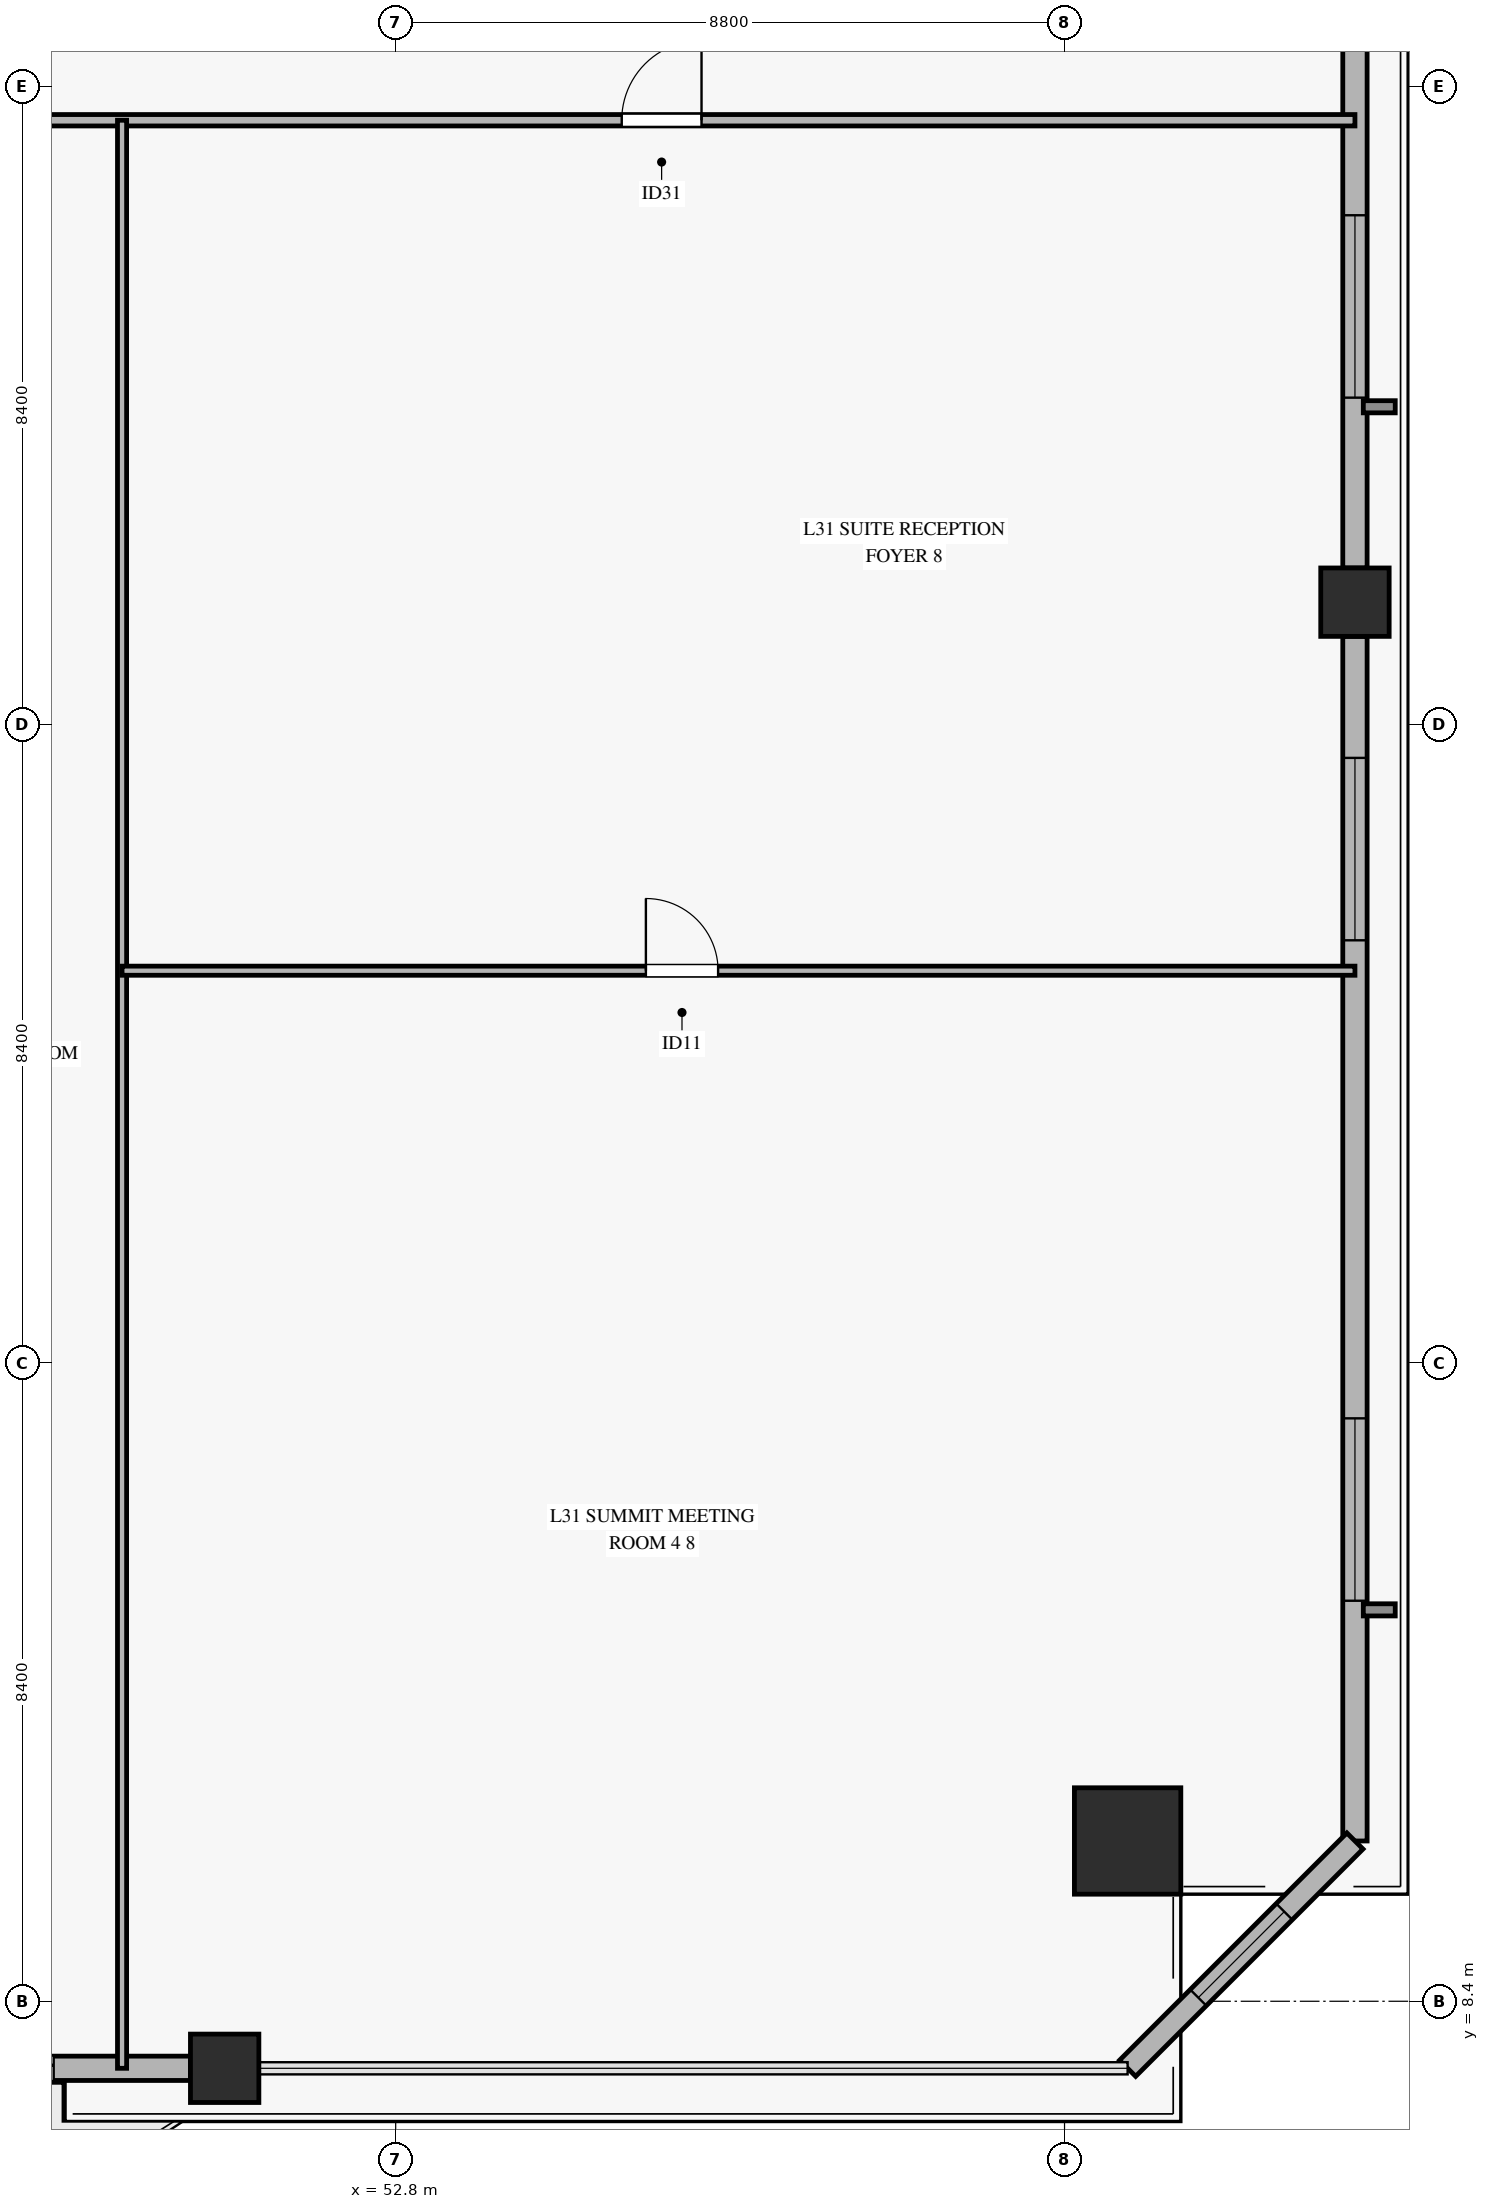
"""IFC4 building model, lengths in metres.
Left out: names, types, materials, properties, quantities, classifications, styles, units other than length and angle.
Written with IfcOpenShell. Run it as: python <this file> out.ifc"""

import sys

from ifc_helpers import new_model, si_unit, direction, frame, frame_2d, origin, origin_2d, place, context, subcontext, project, spatial, rectangle, hollow_rectangle, extrude, source, transform, mapped, element, fill, save


model = new_model("IFC4")
c1 = context("Model", 3, precision=1e-05, world=origin(), true_north=direction((0.0, 1.0)))
c2 = subcontext(c1, "Body", "Model", "MODEL_VIEW")
j1 = project(units=[si_unit("LENGTHUNIT", "METRE"), si_unit("PLANEANGLEUNIT", "RADIAN")], contexts=[c1])
p1 = place(None, origin())
s1 = spatial("IfcSite", under=j1, at=p1, CompositionType="ELEMENT")
p2 = place(p1, origin())
s2 = spatial("IfcBuilding", under=s1, at=p2, CompositionType="ELEMENT")
p3 = place(p2, frame((0.0, 0.0, 127.0)))
s3 = spatial("IfcBuildingStorey", under=s2, at=p3, CompositionType="ELEMENT", Elevation=127.0)
m1 = source(origin(), c2, "Body", "SweptSolid", [
    extrude(hollow_rectangle(XDim=1.4, YDim=1.4, WallThickness=0.065, at=origin_2d()), origin(), (0.0, 0.0, 1.0), 3.64),
])
p4 = place(p3, frame((62.43, 10.509, 0.0), z_axis=(0.0, 0.0, 1.0), x_axis=(1.0, 0.0, 0.0)))
e1 = element("IfcColumn", 1, at=p4, inside=s3, PredefinedType="COLUMN", context=c2, shape_type="MappedRepresentation", body=[
    mapped(m1, transform((0.0, 0.0, 0.0), x_axis=(1.0, 0.0, 0.0), y_axis=(0.0, 1.0, 0.0), z_axis=(0.0, 0.0, 1.0), scale=1.0)),
])
m2 = source(origin(), c2, "Body", "SweptSolid", [
    extrude(hollow_rectangle(XDim=0.9, YDim=0.9, WallThickness=0.04, at=origin_2d()), origin(), (0.0, 0.0, 1.0), 3.64),
])
for number, where, z_axis, x_axis in (
    (2, (50.55, 7.518, 0.0), (0.0, 0.0, 1.0), (1.0, 0.0, 0.0)),
    (3, (65.421, 26.809, 0.0), (0.0, 0.0, 1.0), (1.0, 0.0, 0.0)),
):
    element("IfcColumn", number, at=place(p3, frame(where, z_axis=z_axis, x_axis=x_axis)), inside=s3, PredefinedType="COLUMN", context=c2, shape_type="MappedRepresentation", body=[
        mapped(m2, transform((0.0, 0.0, 0.0), x_axis=(1.0, 0.0, 0.0), y_axis=(0.0, 1.0, 0.0), z_axis=(0.0, 0.0, 1.0), scale=1.0)),
    ])
p5 = place(p3, frame((44.75, 7.518, 0.0), z_axis=(0.0, 0.0, 1.0), x_axis=(1.0, 0.0, 0.0)))
e4 = element("IfcWall", 4, at=p5, inside=s3, PredefinedType="SOLIDWALL", context=c2, shape_type="SweptSolid", body=[
    extrude(rectangle(XDim=5.35, YDim=0.32, at=frame_2d((2.675, 0.0))), origin(), (0.0, 0.0, 1.0), 3.12),
])
p6 = place(p5, frame((1.75, 0.0, 0.0)))
e5 = element("IfcOpeningElement", 5, at=p6, cuts=e4, PredefinedType="OPENING", context=c2, shape_type="SweptSolid", body=[
    extrude(rectangle(XDim=1.8, YDim=2.25, at=frame_2d((0.9, 1.125))), frame((0.0, 0.17, 0.0), z_axis=(0.0, -1.0, 0.0), x_axis=(1.0, 0.0, 0.0)), (0.0, 0.0, 1.0), 0.34),
])
p7 = place(p3, frame((65.421, 10.509, 0.0), z_axis=(0.0, 0.0, 1.0), x_axis=(0.0, 1.0, 0.0)))
e6 = element("IfcWall", 6, at=p7, inside=s3, PredefinedType="SOLIDWALL", context=c2, shape_type="SweptSolid", body=[
    extrude(rectangle(XDim=15.85, YDim=0.32, at=frame_2d((7.925, 0.0))), origin(), (0.0, 0.0, 1.0), 3.12),
])
p8 = place(p7, frame((3.161, 0.0, 0.45)))
e7 = element("IfcOpeningElement", 7, at=p8, cuts=e6, PredefinedType="OPENING", context=c2, shape_type="SweptSolid", body=[
    extrude(rectangle(XDim=2.4, YDim=2.1, at=frame_2d((1.2, 1.05))), frame((0.0, 0.17, 0.0), z_axis=(0.0, -1.0, 0.0), x_axis=(1.0, 0.0, 0.0)), (0.0, 0.0, 1.0), 0.34),
])
p9 = place(p7, frame((11.851, 0.0, 0.45)))
e8 = element("IfcOpeningElement", 8, at=p9, cuts=e6, PredefinedType="OPENING", context=c2, shape_type="SweptSolid", body=[
    extrude(rectangle(XDim=2.4, YDim=2.1, at=frame_2d((1.2, 1.05))), frame((0.0, 0.17, 0.0), z_axis=(0.0, -1.0, 0.0), x_axis=(1.0, 0.0, 0.0)), (0.0, 0.0, 1.0), 0.34),
])
p10 = place(p3, frame((65.421, 27.259, 0.0), z_axis=(0.0, 0.0, 1.0), x_axis=(0.0, 1.0, 0.0)))
e9 = element("IfcWall", 9, at=p10, inside=s3, PredefinedType="SOLIDWALL", context=c2, shape_type="SweptSolid", body=[
    extrude(rectangle(XDim=15.85, YDim=0.32, at=frame_2d((7.925, 0.0))), origin(), (0.0, 0.0, 1.0), 3.12),
])
p11 = place(p10, frame((2.241, 0.0, 0.45)))
e10 = element("IfcOpeningElement", 10, at=p11, cuts=e9, PredefinedType="OPENING", context=c2, shape_type="SweptSolid", body=[
    extrude(rectangle(XDim=2.4, YDim=2.1, at=frame_2d((1.2, 1.05))), frame((0.0, 0.17, 0.0), z_axis=(0.0, -1.0, 0.0), x_axis=(1.0, 0.0, 0.0)), (0.0, 0.0, 1.0), 0.34),
])
p12 = place(p10, frame((12.708, 0.0, 0.45)))
e11 = element("IfcOpeningElement", 11, at=p12, cuts=e9, PredefinedType="OPENING", context=c2, shape_type="SweptSolid", body=[
    extrude(rectangle(XDim=2.4, YDim=2.1, at=frame_2d((1.2, 1.05))), frame((0.0, 0.17, 0.0), z_axis=(0.0, -1.0, 0.0), x_axis=(1.0, 0.0, 0.0)), (0.0, 0.0, 1.0), 0.34),
])
p13 = place(p3, frame((62.43, 7.518, 0.0), z_axis=(0.0, 0.0, 1.0), x_axis=(0.707106781187, 0.707106781187, 0.0)))
e12 = element("IfcWall", 12, at=p13, inside=s3, PredefinedType="SOLIDWALL", context=c2, shape_type="SweptSolid", body=[
    extrude(rectangle(XDim=4.23, YDim=0.3, at=frame_2d((2.115, 0.0))), origin(), (0.0, 0.0, 1.0), 3.12),
])
p14 = place(p13, frame((1.315, 0.0, 0.45)))
e13 = element("IfcOpeningElement", 13, at=p14, cuts=e12, PredefinedType="OPENING", context=c2, shape_type="SweptSolid", body=[
    extrude(rectangle(XDim=1.6, YDim=2.0, at=frame_2d((0.8, 1.0))), frame((0.0, 0.16, 0.0), z_axis=(0.0, -1.0, 0.0), x_axis=(1.0, 0.0, 0.0)), (0.0, 0.0, 1.0), 0.32),
])
p15 = place(p3, frame((4.979, 33.15, 0.0), z_axis=(0.0, 0.0, 1.0), x_axis=(1.0, 0.0, 0.0)))
e14 = element("IfcWall", 14, at=p15, inside=s3, PredefinedType="PARTITIONING", context=c2, shape_type="SweptSolid", body=[
    extrude(rectangle(XDim=60.442, YDim=0.15, at=frame_2d((30.221, 0.0))), origin(), (0.0, 0.0, 1.0), 2.725),
])
p16 = place(p15, frame((6.774, 0.0, 0.0)))
e15 = element("IfcOpeningElement", 15, at=p16, cuts=e14, PredefinedType="OPENING", context=c2, shape_type="SweptSolid", body=[
    extrude(rectangle(XDim=1.05, YDim=2.15, at=frame_2d((0.525, 1.075))), frame((0.0, 0.085, 0.0), z_axis=(0.0, -1.0, 0.0), x_axis=(1.0, 0.0, 0.0)), (0.0, 0.0, 1.0), 0.17),
])
p17 = place(p15, frame((17.131, 0.0, 0.0)))
e16 = element("IfcOpeningElement", 16, at=p17, cuts=e14, PredefinedType="OPENING", context=c2, shape_type="SweptSolid", body=[
    extrude(rectangle(XDim=1.05, YDim=2.15, at=frame_2d((0.525, 1.075))), frame((0.0, 0.085, 0.0), z_axis=(0.0, -1.0, 0.0), x_axis=(1.0, 0.0, 0.0)), (0.0, 0.0, 1.0), 0.17),
])
p18 = place(p15, frame((21.191, 0.0, 0.0)))
e17 = element("IfcOpeningElement", 17, at=p18, cuts=e14, PredefinedType="OPENING", context=c2, shape_type="SweptSolid", body=[
    extrude(rectangle(XDim=1.05, YDim=2.15, at=frame_2d((0.525, 1.075))), frame((0.0, 0.085, 0.0), z_axis=(0.0, -1.0, 0.0), x_axis=(1.0, 0.0, 0.0)), (0.0, 0.0, 1.0), 0.17),
])
p19 = place(p15, frame((26.768, 0.0, 0.0)))
e18 = element("IfcOpeningElement", 18, at=p19, cuts=e14, PredefinedType="OPENING", context=c2, shape_type="SweptSolid", body=[
    extrude(rectangle(XDim=1.05, YDim=2.15, at=frame_2d((0.525, 1.075))), frame((0.0, 0.085, 0.0), z_axis=(0.0, -1.0, 0.0), x_axis=(1.0, 0.0, 0.0)), (0.0, 0.0, 1.0), 0.17),
])
p20 = place(p15, frame((31.968, 0.0, 0.0)))
e19 = element("IfcOpeningElement", 19, at=p20, cuts=e14, PredefinedType="OPENING", context=c2, shape_type="SweptSolid", body=[
    extrude(rectangle(XDim=1.05, YDim=2.15, at=frame_2d((0.525, 1.075))), frame((0.0, 0.085, 0.0), z_axis=(0.0, -1.0, 0.0), x_axis=(1.0, 0.0, 0.0)), (0.0, 0.0, 1.0), 0.17),
])
p21 = place(p15, frame((37.084, 0.0, 0.0)))
e20 = element("IfcOpeningElement", 20, at=p21, cuts=e14, PredefinedType="OPENING", context=c2, shape_type="SweptSolid", body=[
    extrude(rectangle(XDim=1.05, YDim=2.15, at=frame_2d((0.525, 1.075))), frame((0.0, 0.085, 0.0), z_axis=(0.0, -1.0, 0.0), x_axis=(1.0, 0.0, 0.0)), (0.0, 0.0, 1.0), 0.17),
])
p22 = place(p15, frame((41.832, 0.0, 0.0)))
e21 = element("IfcOpeningElement", 21, at=p22, cuts=e14, PredefinedType="OPENING", context=c2, shape_type="SweptSolid", body=[
    extrude(rectangle(XDim=1.05, YDim=2.15, at=frame_2d((0.525, 1.075))), frame((0.0, 0.085, 0.0), z_axis=(0.0, -1.0, 0.0), x_axis=(1.0, 0.0, 0.0)), (0.0, 0.0, 1.0), 0.17),
])
p23 = place(p15, frame((50.795, 0.0, 0.0)))
e22 = element("IfcOpeningElement", 22, at=p23, cuts=e14, PredefinedType="OPENING", context=c2, shape_type="SweptSolid", body=[
    extrude(rectangle(XDim=1.05, YDim=2.15, at=frame_2d((0.525, 1.075))), frame((0.0, 0.085, 0.0), z_axis=(0.0, -1.0, 0.0), x_axis=(1.0, 0.0, 0.0)), (0.0, 0.0, 1.0), 0.17),
])
p24 = place(p3, frame((49.2, 7.518, 0.0), z_axis=(0.0, 0.0, 1.0), x_axis=(0.0, 1.0, 0.0)))
e23 = element("IfcWall", 23, at=p24, inside=s3, PredefinedType="PARTITIONING", context=c2, shape_type="SweptSolid", body=[
    extrude(rectangle(XDim=25.632, YDim=0.12, at=frame_2d((12.816, 0.0))), origin(), (0.0, 0.0, 1.0), 3.125),
])
p25 = place(p3, frame((49.2, 21.96, 0.0), z_axis=(0.0, 0.0, 1.0), x_axis=(1.0, 0.0, 0.0)))
e24 = element("IfcWall", 24, at=p25, inside=s3, PredefinedType="PARTITIONING", context=c2, shape_type="SweptSolid", body=[
    extrude(rectangle(XDim=16.221, YDim=0.12, at=frame_2d((8.11, 0.0))), origin(), (0.0, 0.0, 1.0), 2.725),
])
p26 = place(p25, frame((6.892, 0.0, 0.0)))
e25 = element("IfcOpeningElement", 25, at=p26, cuts=e24, PredefinedType="OPENING", context=c2, shape_type="SweptSolid", body=[
    extrude(rectangle(XDim=0.95, YDim=2.1, at=frame_2d((0.475, 1.05))), frame((0.0, 0.07, 0.0), z_axis=(0.0, -1.0, 0.0), x_axis=(1.0, 0.0, 0.0)), (0.0, 0.0, 1.0), 0.14),
])
m3 = source(origin(), c2, "Body", "SweptSolid", [
    extrude(rectangle(XDim=1.8, YDim=2.25, at=frame_2d((0.9, 1.125))), frame((0.0, 0.025, 0.0), z_axis=(0.0, -1.0, 0.0), x_axis=(1.0, 0.0, 0.0)), (0.0, 0.0, 1.0), 0.05),
])
p27 = place(p6, origin())
e26 = element("IfcDoor", 26, at=p27, inside=s3, OperationType="SLIDING_TO_LEFT", PredefinedType="DOOR", context=c2, shape_type="MappedRepresentation", body=[
    mapped(m3, transform((0.0, 0.0, 0.0), x_axis=(1.0, 0.0, 0.0), y_axis=(0.0, 1.0, 0.0), z_axis=(0.0, 0.0, 1.0), scale=1.0)),
])
fill(e5, e26)
m4 = source(origin(), c2, "Body", "SweptSolid", [
    extrude(rectangle(XDim=2.4, YDim=2.1, at=frame_2d((1.2, 1.05))), frame((0.0, 0.03, 0.0), z_axis=(0.0, -1.0, 0.0), x_axis=(1.0, 0.0, 0.0)), (0.0, 0.0, 1.0), 0.06),
])
p28 = place(p8, origin())
e27 = element("IfcWindow", 27, at=p28, inside=s3, PartitioningType="SINGLE_PANEL", PredefinedType="WINDOW", context=c2, shape_type="MappedRepresentation", body=[
    mapped(m4, transform((0.0, 0.0, 0.0), x_axis=(1.0, 0.0, 0.0), y_axis=(0.0, 1.0, 0.0), z_axis=(0.0, 0.0, 1.0), scale=1.0)),
])
fill(e7, e27)
p29 = place(p9, origin())
e28 = element("IfcWindow", 28, at=p29, inside=s3, PartitioningType="SINGLE_PANEL", PredefinedType="WINDOW", context=c2, shape_type="MappedRepresentation", body=[
    mapped(m4, transform((0.0, 0.0, 0.0), x_axis=(1.0, 0.0, 0.0), y_axis=(0.0, 1.0, 0.0), z_axis=(0.0, 0.0, 1.0), scale=1.0)),
])
fill(e8, e28)
p30 = place(p11, origin())
e29 = element("IfcWindow", 29, at=p30, inside=s3, PartitioningType="SINGLE_PANEL", PredefinedType="WINDOW", context=c2, shape_type="MappedRepresentation", body=[
    mapped(m4, transform((0.0, 0.0, 0.0), x_axis=(1.0, 0.0, 0.0), y_axis=(0.0, 1.0, 0.0), z_axis=(0.0, 0.0, 1.0), scale=1.0)),
])
fill(e10, e29)
m5 = source(origin(), c2, "Body", "SweptSolid", [
    extrude(rectangle(XDim=1.6, YDim=2.0, at=frame_2d((0.8, 1.0))), frame((0.0, 0.03, 0.0), z_axis=(0.0, -1.0, 0.0), x_axis=(1.0, 0.0, 0.0)), (0.0, 0.0, 1.0), 0.06),
])
p31 = place(p14, origin())
e30 = element("IfcWindow", 30, at=p31, inside=s3, PartitioningType="SINGLE_PANEL", PredefinedType="WINDOW", context=c2, shape_type="MappedRepresentation", body=[
    mapped(m5, transform((0.0, 0.0, 0.0), x_axis=(1.0, 0.0, 0.0), y_axis=(0.0, 1.0, 0.0), z_axis=(0.0, 0.0, 1.0), scale=1.0)),
])
fill(e13, e30)
m6 = source(origin(), c2, "Body", "SweptSolid", [
    extrude(rectangle(XDim=1.05, YDim=2.15, at=frame_2d((0.525, 1.075))), frame((0.0, 0.025, 0.0), z_axis=(0.0, -1.0, 0.0), x_axis=(1.0, 0.0, 0.0)), (0.0, 0.0, 1.0), 0.05),
])
p32 = place(p23, origin())
e31 = element("IfcDoor", 31, at=p32, inside=s3, OperationType="SINGLE_SWING_RIGHT", PredefinedType="DOOR", context=c2, shape_type="MappedRepresentation", body=[
    mapped(m6, transform((0.0, 0.0, 0.0), x_axis=(1.0, 0.0, 0.0), y_axis=(0.0, 1.0, 0.0), z_axis=(0.0, 0.0, 1.0), scale=1.0)),
])
fill(e22, e31)
m7 = source(origin(), c2, "Body", "SweptSolid", [
    extrude(rectangle(XDim=0.95, YDim=2.1, at=frame_2d((0.475, 1.05))), frame((0.0, 0.025, 0.0), z_axis=(0.0, -1.0, 0.0), x_axis=(1.0, 0.0, 0.0)), (0.0, 0.0, 1.0), 0.05),
])
p33 = place(p26, origin())
e32 = element("IfcDoor", 32, at=p33, inside=s3, OperationType="SINGLE_SWING_LEFT", PredefinedType="DOOR", context=c2, shape_type="MappedRepresentation", body=[
    mapped(m7, transform((0.0, 0.0, 0.0), x_axis=(1.0, 0.0, 0.0), y_axis=(0.0, 1.0, 0.0), z_axis=(0.0, 0.0, 1.0), scale=1.0)),
])
fill(e25, e32)
save(model, sys.argv[1])
